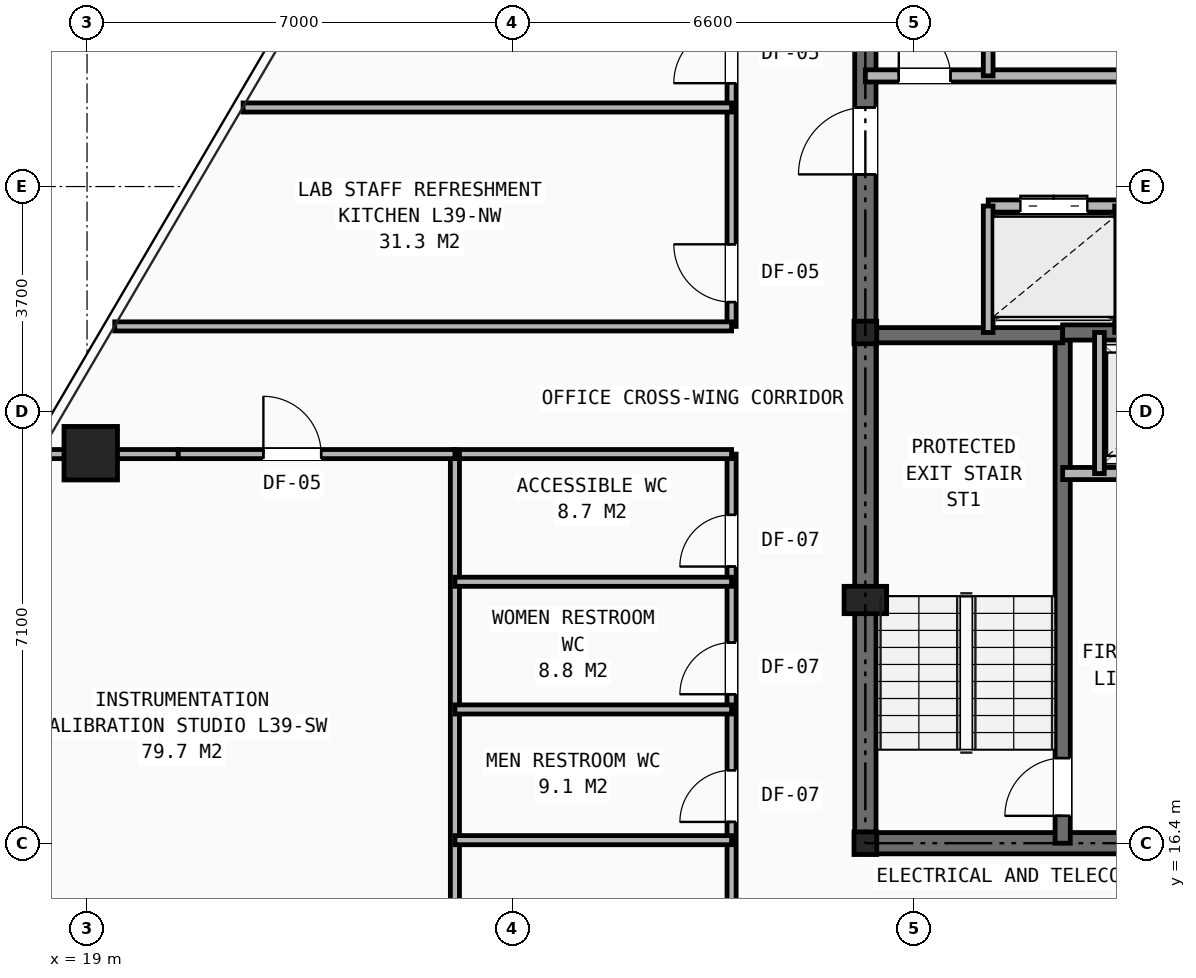
"""IFC4 building model, lengths in metres.
Left out: names, types, materials, properties, quantities, classifications, styles, units other than length and angle.
Written with IfcOpenShell. Run it as: python <this file> out.ifc"""

import sys

from ifc_helpers import new_model, si_unit, direction, frame, frame_2d, origin, origin_2d, place, context, subcontext, project, spatial, rectangle, hollow_rectangle, i_section, extrude, element, fill, save


model = new_model("IFC4")
c1 = context("Model", 3, precision=1e-05, world=origin(), true_north=direction((0.0, 1.0)))
c2 = subcontext(c1, "Body", "Model", "MODEL_VIEW")
j1 = project(units=[si_unit("LENGTHUNIT", "METRE"), si_unit("PLANEANGLEUNIT", "RADIAN")], contexts=[c1])
p1 = place(None, origin())
s1 = spatial("IfcSite", under=j1, at=p1, CompositionType="ELEMENT")
p2 = place(p1, origin())
s2 = spatial("IfcBuilding", under=s1, at=p2, CompositionType="ELEMENT")
p3 = place(p2, frame((0.0, 0.0, 136.7)))
s3 = spatial("IfcBuildingStorey", under=s2, at=p3, CompositionType="ELEMENT", Elevation=136.7)
for number, where, z_axis, x_axis in (
    (1, (31.8, 16.4, 0.0), (0.0, 0.0, 1.0), (1.0, 0.0, 0.0)),
    (2, (31.8, 24.8, 0.0), (0.0, 0.0, 1.0), (1.0, 0.0, 0.0)),
):
    element("IfcColumn", number, at=place(p3, frame(where, z_axis=z_axis, x_axis=x_axis)), inside=s3, PredefinedType="COLUMN", context=c2, shape_type="SweptSolid", body=[
        extrude(i_section(OverallWidth=0.374, OverallDepth=0.372, WebThickness=0.016, FlangeThickness=0.026, at=origin_2d()), origin(), (0.0, 0.0, 1.0), 3.45),
    ])
p4 = place(p3, frame((31.8, 20.4, 0.0), z_axis=(0.0, 0.0, 1.0), x_axis=(1.0, 0.0, 0.0)))
e3 = element("IfcColumn", 3, at=p4, inside=s3, PredefinedType="PILASTER", context=c2, shape_type="SweptSolid", body=[
    extrude(rectangle(XDim=0.7, YDim=0.45, at=origin_2d()), origin(), (0.0, 0.0, 1.0), 3.45),
])
p5 = place(p3, frame((19.061, 22.814, 0.0), z_axis=(0.0, 0.0, 1.0), x_axis=(1.0, 0.0, 0.0)))
e4 = element("IfcColumn", 4, at=p5, inside=s3, PredefinedType="COLUMN", context=c2, shape_type="SweptSolid", body=[
    extrude(hollow_rectangle(XDim=0.88, YDim=0.88, WallThickness=0.06, at=origin_2d()), origin(), (0.0, 0.0, 1.0), 3.45),
])
p6 = place(p3, frame((31.8, 16.4, 0.0), z_axis=(0.0, 0.0, 1.0), x_axis=(1.0, 0.0, 0.0)))
e5 = element("IfcWall", 5, at=p6, inside=s3, PredefinedType="SHEAR", context=c2, shape_type="SweptSolid", body=[
    extrude(rectangle(XDim=16.4, YDim=0.35, at=frame_2d((8.2, 0.0))), origin(), (0.0, 0.0, 1.0), 3.21),
])
p7 = place(p6, frame((7.75, 0.0, 0.0)))
e6 = element("IfcOpeningElement", 6, at=p7, cuts=e5, PredefinedType="OPENING", context=c2, shape_type="SweptSolid", body=[
    extrude(rectangle(XDim=0.9, YDim=2.1, at=frame_2d((0.45, 1.05))), frame((0.0, 0.185, 0.0), z_axis=(0.0, -1.0, 0.0), x_axis=(1.0, 0.0, 0.0)), (0.0, 0.0, 1.0), 0.37),
])
p8 = place(p6, frame((4.2, 0.0, 0.0)))
e7 = element("IfcOpeningElement", 7, at=p8, cuts=e5, PredefinedType="OPENING", context=c2, shape_type="SweptSolid", body=[
    extrude(rectangle(XDim=0.95, YDim=2.1, at=frame_2d((0.475, 1.05))), frame((0.0, 0.185, 0.0), z_axis=(0.0, -1.0, 0.0), x_axis=(1.0, 0.0, 0.0)), (0.0, 0.0, 1.0), 0.37),
])
p9 = place(p6, frame((10.6, 0.0, 0.0)))
e8 = element("IfcOpeningElement", 8, at=p9, cuts=e5, PredefinedType="OPENING", context=c2, shape_type="SweptSolid", body=[
    extrude(rectangle(XDim=0.95, YDim=2.1, at=frame_2d((0.475, 1.05))), frame((0.0, 0.185, 0.0), z_axis=(0.0, -1.0, 0.0), x_axis=(1.0, 0.0, 0.0)), (0.0, 0.0, 1.0), 0.37),
])
p10 = place(p3, frame((31.8, 16.4, 0.0), z_axis=(0.0, 0.0, 1.0), x_axis=(0.0, 1.0, 0.0)))
e9 = element("IfcWall", 9, at=p10, inside=s3, PredefinedType="SHEAR", context=c2, shape_type="SweptSolid", body=[
    extrude(rectangle(XDim=14.8, YDim=0.35, at=frame_2d((7.4, 0.0))), origin(), (0.0, 0.0, 1.0), 3.21),
])
p11 = place(p10, frame((11.0, 0.0, 0.0)))
e10 = element("IfcOpeningElement", 10, at=p11, cuts=e9, PredefinedType="OPENING", context=c2, shape_type="SweptSolid", body=[
    extrude(rectangle(XDim=1.1, YDim=2.15, at=frame_2d((0.55, 1.075))), frame((0.0, 0.185, 0.0), z_axis=(0.0, -1.0, 0.0), x_axis=(1.0, 0.0, 0.0)), (0.0, 0.0, 1.0), 0.37),
])
p12 = place(p3, frame((35.045, 16.4, 0.0), z_axis=(0.0, 0.0, 1.0), x_axis=(0.0, 1.0, 0.0)))
e11 = element("IfcWall", 11, at=p12, inside=s3, PredefinedType="SHEAR", context=c2, shape_type="SweptSolid", body=[
    extrude(rectangle(XDim=8.4, YDim=0.25, at=frame_2d((4.2, 0.0))), origin(), (0.0, 0.0, 1.0), 3.21),
])
p13 = place(p12, frame((0.45, 0.0, 0.0)))
e12 = element("IfcOpeningElement", 12, at=p13, cuts=e11, PredefinedType="OPENING", context=c2, shape_type="SweptSolid", body=[
    extrude(rectangle(XDim=0.95, YDim=2.1, at=frame_2d((0.475, 1.05))), frame((0.0, 0.135, 0.0), z_axis=(0.0, -1.0, 0.0), x_axis=(1.0, 0.0, 0.0)), (0.0, 0.0, 1.0), 0.27),
])
p14 = place(p3, frame((31.8, 24.755, 0.0), z_axis=(0.0, 0.0, 1.0), x_axis=(1.0, 0.0, 0.0)))
e13 = element("IfcWall", 13, at=p14, inside=s3, PredefinedType="SHEAR", context=c2, shape_type="SweptSolid", body=[
    extrude(rectangle(XDim=3.245, YDim=0.25, at=frame_2d((1.623, 0.0))), origin(), (0.0, 0.0, 1.0), 3.21),
])
p15 = place(p3, frame((35.045, 24.8, 0.0), z_axis=(0.0, 0.0, 1.0), x_axis=(1.0, 0.0, 0.0)))
e14 = element("IfcWall", 14, at=p15, inside=s3, PredefinedType="SHEAR", context=c2, shape_type="SweptSolid", body=[
    extrude(rectangle(XDim=9.91, YDim=0.25, at=frame_2d((4.955, 0.0))), origin(), (0.0, 0.0, 1.0), 3.21),
])
p16 = place(p3, frame((35.045, 22.48, 0.0), z_axis=(0.0, 0.0, 1.0), x_axis=(1.0, 0.0, 0.0)))
e15 = element("IfcWall", 15, at=p16, inside=s3, PredefinedType="SOLIDWALL", context=c2, shape_type="SweptSolid", body=[
    extrude(rectangle(XDim=9.91, YDim=0.2, at=frame_2d((4.955, 0.0))), origin(), (0.0, 0.0, 1.0), 3.21),
])
p17 = place(p16, frame((1.255, 0.0, 0.0)))
e16 = element("IfcOpeningElement", 16, at=p17, cuts=e15, PredefinedType="OPENING", context=c2, shape_type="SweptSolid", body=[
    extrude(rectangle(XDim=1.1, YDim=2.15, at=frame_2d((0.55, 1.075))), frame((0.0, 0.11, 0.0), z_axis=(0.0, -1.0, 0.0), x_axis=(1.0, 0.0, 0.0)), (0.0, 0.0, 1.0), 0.22),
])
p18 = place(p16, frame((7.555, 0.0, 0.0)))
e17 = element("IfcOpeningElement", 17, at=p18, cuts=e15, PredefinedType="OPENING", context=c2, shape_type="SweptSolid", body=[
    extrude(rectangle(XDim=1.1, YDim=2.15, at=frame_2d((0.55, 1.075))), frame((0.0, 0.11, 0.0), z_axis=(0.0, -1.0, 0.0), x_axis=(1.0, 0.0, 0.0)), (0.0, 0.0, 1.0), 0.22),
])
p19 = place(p16, frame((4.405, 0.0, 0.0)))
e18 = element("IfcOpeningElement", 18, at=p19, cuts=e15, PredefinedType="OPENING", context=c2, shape_type="SweptSolid", body=[
    extrude(rectangle(XDim=1.1, YDim=2.15, at=frame_2d((0.55, 1.075))), frame((0.0, 0.11, 0.0), z_axis=(0.0, -1.0, 0.0), x_axis=(1.0, 0.0, 0.0)), (0.0, 0.0, 1.0), 0.22),
])
p20 = place(p3, frame((35.65, 22.48, 0.0), z_axis=(0.0, 0.0, 1.0), x_axis=(0.0, 1.0, 0.0)))
e19 = element("IfcWall", 19, at=p20, inside=s3, PredefinedType="SOLIDWALL", context=c2, shape_type="SweptSolid", body=[
    extrude(rectangle(XDim=2.32, YDim=0.16, at=frame_2d((1.16, 0.0))), origin(), (0.0, 0.0, 1.0), 3.21),
])
p21 = place(p3, frame((31.8, 29.02, 0.0), z_axis=(0.0, 0.0, 1.0), x_axis=(1.0, 0.0, 0.0)))
e20 = element("IfcWall", 20, at=p21, inside=s3, PredefinedType="SOLIDWALL", context=c2, shape_type="SweptSolid", body=[
    extrude(rectangle(XDim=16.4, YDim=0.2, at=frame_2d((8.2, 0.0))), origin(), (0.0, 0.0, 1.0), 2.661),
])
p22 = place(p21, frame((0.55, 0.0, 0.0)))
e21 = element("IfcOpeningElement", 21, at=p22, cuts=e20, PredefinedType="OPENING", context=c2, shape_type="SweptSolid", body=[
    extrude(rectangle(XDim=0.85, YDim=2.05, at=frame_2d((0.425, 1.025))), frame((0.0, 0.11, 0.0), z_axis=(0.0, -1.0, 0.0), x_axis=(1.0, 0.0, 0.0)), (0.0, 0.0, 1.0), 0.22),
])
p23 = place(p21, frame((5.94, 0.0, 0.0)))
e22 = element("IfcOpeningElement", 22, at=p23, cuts=e20, PredefinedType="OPENING", context=c2, shape_type="SweptSolid", body=[
    extrude(rectangle(XDim=0.9, YDim=2.1, at=frame_2d((0.45, 1.05))), frame((0.0, 0.11, 0.0), z_axis=(0.0, -1.0, 0.0), x_axis=(1.0, 0.0, 0.0)), (0.0, 0.0, 1.0), 0.22),
])
p24 = place(p3, frame((33.82, 26.88, 0.0), z_axis=(0.0, 0.0, 1.0), x_axis=(1.0, 0.0, 0.0)))
e23 = element("IfcWall", 23, at=p24, inside=s3, PredefinedType="SOLIDWALL", context=c2, shape_type="SweptSolid", body=[
    extrude(rectangle(XDim=14.38, YDim=0.2, at=frame_2d((7.19, 0.0))), origin(), (0.0, 0.0, 1.0), 2.661),
])
p25 = place(p24, frame((0.53, 0.0, 0.0)))
e24 = element("IfcOpeningElement", 24, at=p25, cuts=e23, PredefinedType="OPENING", context=c2, shape_type="SweptSolid", body=[
    extrude(rectangle(XDim=1.1, YDim=2.15, at=frame_2d((0.55, 1.075))), frame((0.0, 0.11, 0.0), z_axis=(0.0, -1.0, 0.0), x_axis=(1.0, 0.0, 0.0)), (0.0, 0.0, 1.0), 0.22),
])
p26 = place(p24, frame((2.69, 0.0, 0.0)))
e25 = element("IfcOpeningElement", 25, at=p26, cuts=e23, PredefinedType="OPENING", context=c2, shape_type="SweptSolid", body=[
    extrude(rectangle(XDim=1.1, YDim=2.15, at=frame_2d((0.55, 1.075))), frame((0.0, 0.11, 0.0), z_axis=(0.0, -1.0, 0.0), x_axis=(1.0, 0.0, 0.0)), (0.0, 0.0, 1.0), 0.22),
])
p27 = place(p24, frame((4.85, 0.0, 0.0)))
e26 = element("IfcOpeningElement", 26, at=p27, cuts=e23, PredefinedType="OPENING", context=c2, shape_type="SweptSolid", body=[
    extrude(rectangle(XDim=1.1, YDim=2.15, at=frame_2d((0.55, 1.075))), frame((0.0, 0.11, 0.0), z_axis=(0.0, -1.0, 0.0), x_axis=(1.0, 0.0, 0.0)), (0.0, 0.0, 1.0), 0.22),
])
p28 = place(p24, frame((7.01, 0.0, 0.0)))
e27 = element("IfcOpeningElement", 27, at=p28, cuts=e23, PredefinedType="OPENING", context=c2, shape_type="SweptSolid", body=[
    extrude(rectangle(XDim=1.1, YDim=2.15, at=frame_2d((0.55, 1.075))), frame((0.0, 0.11, 0.0), z_axis=(0.0, -1.0, 0.0), x_axis=(1.0, 0.0, 0.0)), (0.0, 0.0, 1.0), 0.22),
])
p29 = place(p3, frame((33.82, 29.02, 0.0), z_axis=(0.0, 0.0, 1.0), x_axis=(0.0, 1.0, 0.0)))
e28 = element("IfcWall", 28, at=p29, inside=s3, PredefinedType="SOLIDWALL", context=c2, shape_type="SweptSolid", body=[
    extrude(rectangle(XDim=2.18, YDim=0.16, at=frame_2d((1.09, 0.0))), origin(), (0.0, 0.0, 1.0), 2.661),
])
for number, where, z_axis, x_axis in (
    (29, (33.82, 24.8, 0.0), (0.0, 0.0, 1.0), (0.0, 1.0, 0.0)),
    (30, (35.98, 24.8, 0.0), (0.0, 0.0, 1.0), (0.0, 1.0, 0.0)),
):
    element("IfcWall", number, at=place(p3, frame(where, z_axis=z_axis, x_axis=x_axis)), inside=s3, PredefinedType="SOLIDWALL", context=c2, shape_type="SweptSolid", body=[
        extrude(rectangle(XDim=2.08, YDim=0.16, at=frame_2d((1.04, 0.0))), origin(), (0.0, 0.0, 1.0), 3.21),
    ])
p30 = place(p3, frame((29.6, 14.1, 0.0), z_axis=(0.0, 0.0, 1.0), x_axis=(0.0, 1.0, 0.0)))
e31 = element("IfcWall", 31, at=p30, inside=s3, PredefinedType="PARTITIONING", context=c2, shape_type="SweptSolid", body=[
    extrude(rectangle(XDim=8.7, YDim=0.15, at=frame_2d((4.35, 0.0))), origin(), (0.0, 0.0, 1.0), 3.21),
])
p31 = place(p30, frame((2.65, 0.0, 0.0)))
e32 = element("IfcOpeningElement", 32, at=p31, cuts=e31, PredefinedType="OPENING", context=c2, shape_type="SweptSolid", body=[
    extrude(rectangle(XDim=0.85, YDim=2.05, at=frame_2d((0.425, 1.025))), frame((0.0, 0.085, 0.0), z_axis=(0.0, -1.0, 0.0), x_axis=(1.0, 0.0, 0.0)), (0.0, 0.0, 1.0), 0.17),
])
p32 = place(p30, frame((4.75, 0.0, 0.0)))
e33 = element("IfcOpeningElement", 33, at=p32, cuts=e31, PredefinedType="OPENING", context=c2, shape_type="SweptSolid", body=[
    extrude(rectangle(XDim=0.85, YDim=2.05, at=frame_2d((0.425, 1.025))), frame((0.0, 0.085, 0.0), z_axis=(0.0, -1.0, 0.0), x_axis=(1.0, 0.0, 0.0)), (0.0, 0.0, 1.0), 0.17),
])
p33 = place(p30, frame((6.85, 0.0, 0.0)))
e34 = element("IfcOpeningElement", 34, at=p33, cuts=e31, PredefinedType="OPENING", context=c2, shape_type="SweptSolid", body=[
    extrude(rectangle(XDim=0.85, YDim=2.05, at=frame_2d((0.425, 1.025))), frame((0.0, 0.085, 0.0), z_axis=(0.0, -1.0, 0.0), x_axis=(1.0, 0.0, 0.0)), (0.0, 0.0, 1.0), 0.17),
])
p34 = place(p3, frame((29.6, 24.9, 0.0), z_axis=(0.0, 0.0, 1.0), x_axis=(0.0, 1.0, 0.0)))
e35 = element("IfcWall", 35, at=p34, inside=s3, PredefinedType="PARTITIONING", context=c2, shape_type="SweptSolid", body=[
    extrude(rectangle(XDim=13.9, YDim=0.15, at=frame_2d((6.95, 0.0))), origin(), (0.0, 0.0, 1.0), 2.225),
])
p35 = place(p34, frame((0.4, 0.0, 0.0)))
e36 = element("IfcOpeningElement", 36, at=p35, cuts=e35, PredefinedType="OPENING", context=c2, shape_type="SweptSolid", body=[
    extrude(rectangle(XDim=0.95, YDim=2.1, at=frame_2d((0.475, 1.05))), frame((0.0, 0.085, 0.0), z_axis=(0.0, -1.0, 0.0), x_axis=(1.0, 0.0, 0.0)), (0.0, 0.0, 1.0), 0.17),
])
p36 = place(p34, frame((4.0, 0.0, 0.0)))
e37 = element("IfcOpeningElement", 37, at=p36, cuts=e35, PredefinedType="OPENING", context=c2, shape_type="SweptSolid", body=[
    extrude(rectangle(XDim=0.95, YDim=2.1, at=frame_2d((0.475, 1.05))), frame((0.0, 0.085, 0.0), z_axis=(0.0, -1.0, 0.0), x_axis=(1.0, 0.0, 0.0)), (0.0, 0.0, 1.0), 0.17),
])
p37 = place(p34, frame((8.5, 0.0, 0.0)))
e38 = element("IfcOpeningElement", 38, at=p37, cuts=e35, PredefinedType="OPENING", context=c2, shape_type="SweptSolid", body=[
    extrude(rectangle(XDim=0.95, YDim=2.1, at=frame_2d((0.475, 1.05))), frame((0.0, 0.085, 0.0), z_axis=(0.0, -1.0, 0.0), x_axis=(1.0, 0.0, 0.0)), (0.0, 0.0, 1.0), 0.17),
])
p38 = place(p3, frame((18.224, 22.8, 0.0), z_axis=(0.0, 0.0, 1.0), x_axis=(1.0, 0.0, 0.0)))
e39 = element("IfcWall", 39, at=p38, inside=s3, PredefinedType="PARTITIONING", context=c2, shape_type="SweptSolid", body=[
    extrude(rectangle(XDim=2.276, YDim=0.15, at=frame_2d((1.138, 0.0))), origin(), (0.0, 0.0, 1.0), 2.589),
])
p39 = place(p3, frame((25.05, 22.8, 0.0), z_axis=(0.0, 0.0, 1.0), x_axis=(1.0, 0.0, 0.0)))
e40 = element("IfcWall", 40, at=p39, inside=s3, PredefinedType="PARTITIONING", context=c2, shape_type="SweptSolid", body=[
    extrude(rectangle(XDim=4.55, YDim=0.15, at=frame_2d((2.275, 0.0))), origin(), (0.0, 0.0, 1.0), 3.21),
])
p40 = place(p3, frame((19.455, 24.9, 0.0), z_axis=(0.0, 0.0, 1.0), x_axis=(1.0, 0.0, 0.0)))
e41 = element("IfcWall", 41, at=p40, inside=s3, PredefinedType="PARTITIONING", context=c2, shape_type="SweptSolid", body=[
    extrude(rectangle(XDim=10.145, YDim=0.15, at=frame_2d((5.073, 0.0))), origin(), (0.0, 0.0, 1.0), 2.589),
])
p41 = place(p3, frame((25.05, 14.1, 0.0), z_axis=(0.0, 0.0, 1.0), x_axis=(0.0, 1.0, 0.0)))
e42 = element("IfcWall", 42, at=p41, inside=s3, PredefinedType="PARTITIONING", context=c2, shape_type="SweptSolid", body=[
    extrude(rectangle(XDim=8.7, YDim=0.15, at=frame_2d((4.35, 0.0))), origin(), (0.0, 0.0, 1.0), 3.21),
])
for number, where, z_axis, x_axis in (
    (43, (25.05, 16.45, 0.0), (0.0, 0.0, 1.0), (1.0, 0.0, 0.0)),
    (44, (25.05, 18.6, 0.0), (0.0, 0.0, 1.0), (1.0, 0.0, 0.0)),
    (45, (25.05, 20.7, 0.0), (0.0, 0.0, 1.0), (1.0, 0.0, 0.0)),
):
    element("IfcWall", number, at=place(p3, frame(where, z_axis=z_axis, x_axis=x_axis)), inside=s3, PredefinedType="PARTITIONING", context=c2, shape_type="SweptSolid", body=[
        extrude(rectangle(XDim=4.55, YDim=0.15, at=frame_2d((2.275, 0.0))), origin(), (0.0, 0.0, 1.0), 3.21),
    ])
p42 = place(p3, frame((20.5, 22.8, 0.0), z_axis=(0.0, 0.0, 1.0), x_axis=(1.0, 0.0, 0.0)))
e46 = element("IfcWall", 46, at=p42, inside=s3, PredefinedType="PARTITIONING", context=c2, shape_type="SweptSolid", body=[
    extrude(rectangle(XDim=4.55, YDim=0.15, at=frame_2d((2.275, 0.0))), origin(), (0.0, 0.0, 1.0), 3.21),
])
p43 = place(p42, frame((1.4, 0.0, 0.0)))
e47 = element("IfcOpeningElement", 47, at=p43, cuts=e46, PredefinedType="OPENING", context=c2, shape_type="SweptSolid", body=[
    extrude(rectangle(XDim=0.95, YDim=2.1, at=frame_2d((0.475, 1.05))), frame((0.0, 0.085, 0.0), z_axis=(0.0, -1.0, 0.0), x_axis=(1.0, 0.0, 0.0)), (0.0, 0.0, 1.0), 0.17),
])
p44 = place(p3, frame((21.566, 28.5, 0.0), z_axis=(0.0, 0.0, 1.0), x_axis=(1.0, 0.0, 0.0)))
e48 = element("IfcWall", 48, at=p44, inside=s3, PredefinedType="PARTITIONING", context=c2, shape_type="SweptSolid", body=[
    extrude(rectangle(XDim=8.034, YDim=0.15, at=frame_2d((4.017, 0.0))), origin(), (0.0, 0.0, 1.0), 2.589),
])
p45 = place(p13, origin())
e49 = element("IfcDoor", 49, at=p45, inside=s3, OperationType="SINGLE_SWING_LEFT", PredefinedType="DOOR", context=c2, shape_type="SweptSolid", body=[
    extrude(rectangle(XDim=0.95, YDim=2.1, at=frame_2d((0.475, 1.05))), frame((0.0, 0.025, 0.0), z_axis=(0.0, -1.0, 0.0), x_axis=(1.0, 0.0, 0.0)), (0.0, 0.0, 1.0), 0.05),
])
fill(e12, e49)
p46 = place(p22, origin())
e50 = element("IfcDoor", 50, at=p46, inside=s3, OperationType="SINGLE_SWING_LEFT", PredefinedType="DOOR", context=c2, shape_type="SweptSolid", body=[
    extrude(rectangle(XDim=0.85, YDim=2.05, at=frame_2d((0.425, 1.025))), frame((0.0, 0.025, 0.0), z_axis=(0.0, -1.0, 0.0), x_axis=(1.0, 0.0, 0.0)), (0.0, 0.0, 1.0), 0.05),
])
fill(e21, e50)
p47 = place(p11, origin())
e51 = element("IfcDoor", 51, at=p47, inside=s3, OperationType="SINGLE_SWING_LEFT", PredefinedType="DOOR", context=c2, shape_type="SweptSolid", body=[
    extrude(rectangle(XDim=1.1, YDim=2.15, at=frame_2d((0.55, 1.075))), frame((0.0, 0.025, 0.0), z_axis=(0.0, -1.0, 0.0), x_axis=(1.0, 0.0, 0.0)), (0.0, 0.0, 1.0), 0.05),
])
fill(e10, e51)
p48 = place(p25, origin())
e52 = element("IfcDoor", 52, at=p48, inside=s3, OperationType="DOUBLE_DOOR_SLIDING", PredefinedType="DOOR", context=c2, shape_type="SweptSolid", body=[
    extrude(rectangle(XDim=1.1, YDim=2.15, at=frame_2d((0.55, 1.075))), frame((0.0, 0.025, 0.0), z_axis=(0.0, -1.0, 0.0), x_axis=(1.0, 0.0, 0.0)), (0.0, 0.0, 1.0), 0.05),
])
fill(e24, e52)
p49 = place(p31, origin())
e53 = element("IfcDoor", 53, at=p49, inside=s3, OperationType="SINGLE_SWING_LEFT", PredefinedType="DOOR", context=c2, shape_type="SweptSolid", body=[
    extrude(rectangle(XDim=0.85, YDim=2.05, at=frame_2d((0.425, 1.025))), frame((0.0, 0.025, 0.0), z_axis=(0.0, -1.0, 0.0), x_axis=(1.0, 0.0, 0.0)), (0.0, 0.0, 1.0), 0.05),
])
fill(e32, e53)
p50 = place(p32, origin())
e54 = element("IfcDoor", 54, at=p50, inside=s3, OperationType="SINGLE_SWING_LEFT", PredefinedType="DOOR", context=c2, shape_type="SweptSolid", body=[
    extrude(rectangle(XDim=0.85, YDim=2.05, at=frame_2d((0.425, 1.025))), frame((0.0, 0.025, 0.0), z_axis=(0.0, -1.0, 0.0), x_axis=(1.0, 0.0, 0.0)), (0.0, 0.0, 1.0), 0.05),
])
fill(e33, e54)
p51 = place(p33, origin())
e55 = element("IfcDoor", 55, at=p51, inside=s3, OperationType="SINGLE_SWING_LEFT", PredefinedType="DOOR", context=c2, shape_type="SweptSolid", body=[
    extrude(rectangle(XDim=0.85, YDim=2.05, at=frame_2d((0.425, 1.025))), frame((0.0, 0.025, 0.0), z_axis=(0.0, -1.0, 0.0), x_axis=(1.0, 0.0, 0.0)), (0.0, 0.0, 1.0), 0.05),
])
fill(e34, e55)
p52 = place(p43, origin())
e56 = element("IfcDoor", 56, at=p52, inside=s3, OperationType="SINGLE_SWING_LEFT", PredefinedType="DOOR", context=c2, shape_type="SweptSolid", body=[
    extrude(rectangle(XDim=0.95, YDim=2.1, at=frame_2d((0.475, 1.05))), frame((0.0, 0.025, 0.0), z_axis=(0.0, -1.0, 0.0), x_axis=(1.0, 0.0, 0.0)), (0.0, 0.0, 1.0), 0.05),
])
fill(e47, e56)
p53 = place(p35, origin())
e57 = element("IfcDoor", 57, at=p53, inside=s3, OperationType="SINGLE_SWING_RIGHT", PredefinedType="DOOR", context=c2, shape_type="SweptSolid", body=[
    extrude(rectangle(XDim=0.95, YDim=2.1, at=frame_2d((0.475, 1.05))), frame((0.0, 0.025, 0.0), z_axis=(0.0, -1.0, 0.0), x_axis=(1.0, 0.0, 0.0)), (0.0, 0.0, 1.0), 0.05),
])
fill(e36, e57)
p54 = place(p36, origin())
e58 = element("IfcDoor", 58, at=p54, inside=s3, OperationType="SINGLE_SWING_LEFT", PredefinedType="DOOR", context=c2, shape_type="SweptSolid", body=[
    extrude(rectangle(XDim=0.95, YDim=2.1, at=frame_2d((0.475, 1.05))), frame((0.0, 0.025, 0.0), z_axis=(0.0, -1.0, 0.0), x_axis=(1.0, 0.0, 0.0)), (0.0, 0.0, 1.0), 0.05),
])
fill(e37, e58)
save(model, sys.argv[1])
